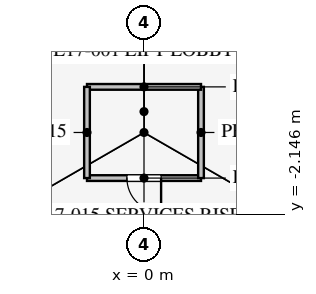
"""IFC4 building model, lengths in metres.
Left out: names, types, materials, properties, quantities, classifications, styles, units other than length and angle.
Written with IfcOpenShell. Run it as: python <this file> out.ifc"""

import sys

from ifc_helpers import new_model, si_unit, direction, frame, frame_2d, origin, place, context, subcontext, project, spatial, rectangle, extrude, element, fill, save


model = new_model("IFC4")
c1 = context("Model", 3, precision=1e-05, world=origin(), true_north=direction((0.0, 1.0)))
c2 = subcontext(c1, "Body", "Model", "MODEL_VIEW")
j1 = project(units=[si_unit("LENGTHUNIT", "METRE"), si_unit("PLANEANGLEUNIT", "RADIAN")], contexts=[c1])
p1 = place(None, origin())
s1 = spatial("IfcSite", under=j1, at=p1, CompositionType="ELEMENT")
p2 = place(p1, origin())
s2 = spatial("IfcBuilding", under=s1, at=p2, CompositionType="ELEMENT")
p3 = place(p2, frame((0.0, 0.0, 75.3)))
s3 = spatial("IfcBuildingStorey", under=s2, at=p3, CompositionType="ELEMENT", Elevation=75.3)
p4 = place(p3, frame((-1.5, -1.2, 0.0), z_axis=(0.0, 0.0, 1.0), x_axis=(1.0, 0.0, 0.0)))
e1 = element("IfcWall", 1, at=p4, inside=s3, PredefinedType="PARTITIONING", context=c2, shape_type="SweptSolid", body=[
    extrude(rectangle(XDim=3.0, YDim=0.15, at=frame_2d((1.5, 0.0))), origin(), (0.0, 0.0, 1.0), 4.0),
])
p5 = place(p4, frame((1.05, 0.0, 0.0)))
e2 = element("IfcOpeningElement", 2, at=p5, cuts=e1, PredefinedType="OPENING", context=c2, shape_type="SweptSolid", body=[
    extrude(rectangle(XDim=0.9, YDim=2.1, at=frame_2d((0.45, 1.05))), frame((0.0, 0.085, 0.0), z_axis=(0.0, -1.0, 0.0), x_axis=(1.0, 0.0, 0.0)), (0.0, 0.0, 1.0), 0.17),
])
p6 = place(p3, frame((1.5, -1.2, 0.0), z_axis=(0.0, 0.0, 1.0), x_axis=(0.0, 1.0, 0.0)))
e3 = element("IfcWall", 3, at=p6, inside=s3, PredefinedType="PARTITIONING", context=c2, shape_type="SweptSolid", body=[
    extrude(rectangle(XDim=2.4, YDim=0.15, at=frame_2d((1.2, 0.0))), origin(), (0.0, 0.0, 1.0), 4.0),
])
p7 = place(p3, frame((1.5, 1.2, 0.0), z_axis=(0.0, 0.0, 1.0), x_axis=(-1.0, 0.0, 0.0)))
e4 = element("IfcWall", 4, at=p7, inside=s3, PredefinedType="PARTITIONING", context=c2, shape_type="SweptSolid", body=[
    extrude(rectangle(XDim=3.0, YDim=0.15, at=frame_2d((1.5, 0.0))), origin(), (0.0, 0.0, 1.0), 4.0),
])
p8 = place(p3, frame((-1.5, 1.2, 0.0), z_axis=(0.0, 0.0, 1.0), x_axis=(0.0, -1.0, 0.0)))
e5 = element("IfcWall", 5, at=p8, inside=s3, PredefinedType="PARTITIONING", context=c2, shape_type="SweptSolid", body=[
    extrude(rectangle(XDim=2.4, YDim=0.15, at=frame_2d((1.2, 0.0))), origin(), (0.0, 0.0, 1.0), 4.0),
])
p9 = place(p3, frame((26.415, -15.231, 0.0), z_axis=(0.0, 0.0, 1.0), x_axis=(-0.50000091641, 0.866024874695, 0.0)))
e6 = element("IfcWall", 6, at=p9, inside=s3, PredefinedType="PARTITIONING", context=c2, shape_type="SweptSolid", body=[
    extrude(rectangle(XDim=52.796, YDim=0.12, at=frame_2d((26.398, 0.0))), origin(), (0.0, 0.0, 1.0), 2.9),
])
p10 = place(p9, frame((10.2, 0.0, 0.15)))
e7 = element("IfcOpeningElement", 7, at=p10, cuts=e6, PredefinedType="OPENING", context=c2, shape_type="SweptSolid", body=[
    extrude(rectangle(XDim=1.8, YDim=2.1, at=frame_2d((0.9, 1.05))), frame((0.0, 0.07, 0.0), z_axis=(0.0, -1.0, 0.0), x_axis=(1.0, 0.0, 0.0)), (0.0, 0.0, 1.0), 0.14),
])
p11 = place(p9, frame((40.8, 0.0, 0.15)))
e8 = element("IfcOpeningElement", 8, at=p11, cuts=e6, PredefinedType="OPENING", context=c2, shape_type="SweptSolid", body=[
    extrude(rectangle(XDim=1.8, YDim=2.1, at=frame_2d((0.9, 1.05))), frame((0.0, 0.07, 0.0), z_axis=(0.0, -1.0, 0.0), x_axis=(1.0, 0.0, 0.0)), (0.0, 0.0, 1.0), 0.14),
])
p12 = place(p3, frame((-0.016, 30.491, 0.0), z_axis=(0.0, 0.0, 1.0), x_axis=(-0.50000091641, -0.866024874695, 0.0)))
e9 = element("IfcWall", 9, at=p12, inside=s3, PredefinedType="PARTITIONING", context=c2, shape_type="SweptSolid", body=[
    extrude(rectangle(XDim=52.796, YDim=0.12, at=frame_2d((26.398, 0.0))), origin(), (0.0, 0.0, 1.0), 2.9),
])
p13 = place(p12, frame((10.2, 0.0, 0.15)))
e10 = element("IfcOpeningElement", 10, at=p13, cuts=e9, PredefinedType="OPENING", context=c2, shape_type="SweptSolid", body=[
    extrude(rectangle(XDim=1.8, YDim=2.1, at=frame_2d((0.9, 1.05))), frame((0.0, 0.07, 0.0), z_axis=(0.0, -1.0, 0.0), x_axis=(1.0, 0.0, 0.0)), (0.0, 0.0, 1.0), 0.14),
])
p14 = place(p12, frame((40.8, 0.0, 0.15)))
e11 = element("IfcOpeningElement", 11, at=p14, cuts=e9, PredefinedType="OPENING", context=c2, shape_type="SweptSolid", body=[
    extrude(rectangle(XDim=1.8, YDim=2.1, at=frame_2d((0.9, 1.05))), frame((0.0, 0.07, 0.0), z_axis=(0.0, -1.0, 0.0), x_axis=(1.0, 0.0, 0.0)), (0.0, 0.0, 1.0), 0.14),
])
p15 = place(p5, frame((0.9, 0.0, 0.0), z_axis=(0.0, 0.0, 1.0), x_axis=(-1.0, 0.0, 0.0)))
e12 = element("IfcDoor", 12, at=p15, inside=s3, OperationType="SINGLE_SWING_LEFT", PredefinedType="DOOR", context=c2, shape_type="SweptSolid", body=[
    extrude(rectangle(XDim=0.9, YDim=2.1, at=frame_2d((0.45, 1.05))), frame((0.0, 0.025, 0.0), z_axis=(0.0, -1.0, 0.0), x_axis=(1.0, 0.0, 0.0)), (0.0, 0.0, 1.0), 0.05),
])
fill(e2, e12)
save(model, sys.argv[1])
